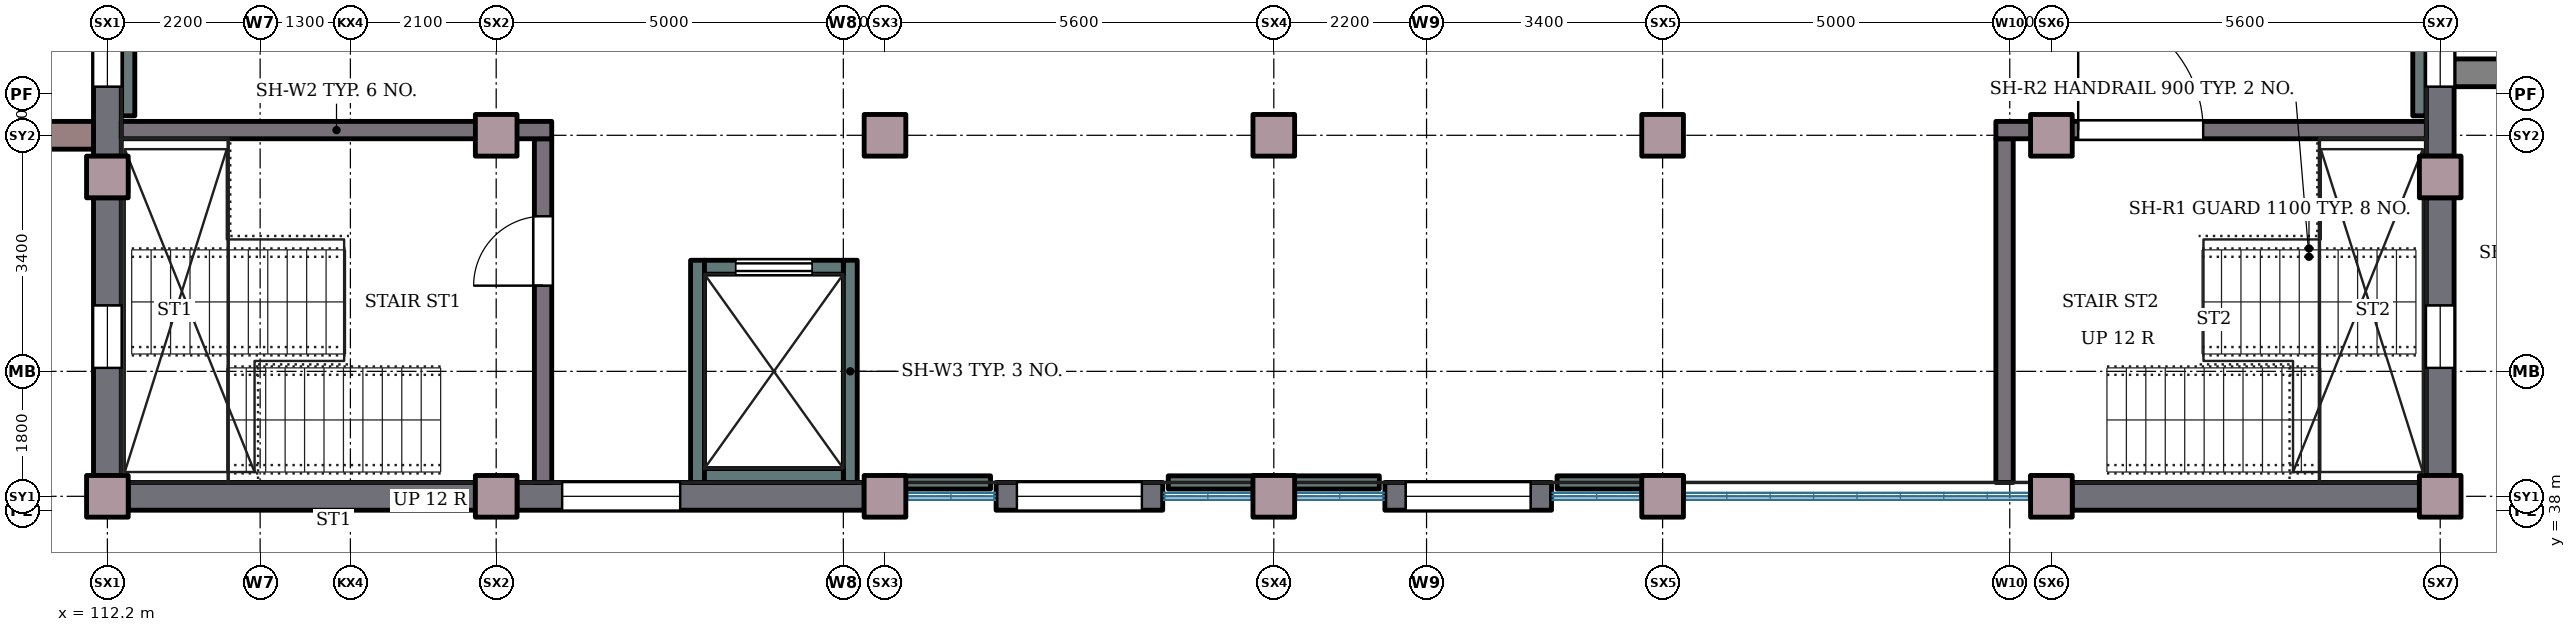
"""IFC4 building model, lengths in metres.
Left out: names, types, materials, properties, quantities, classifications, styles, units other than length and angle.
Written with IfcOpenShell. Run it as: python <this file> out.ifc"""

import sys

from ifc_helpers import new_model, si_unit, direction, frame, frame_2d, origin, origin_2d, place, context, subcontext, project, spatial, rectangle, extrude, element, fill, save


model = new_model("IFC4")
c1 = context("Model", 3, precision=1e-05, world=origin(), true_north=direction((0.0, 1.0)))
c2 = subcontext(c1, "Body", "Model", "MODEL_VIEW")
j1 = project(units=[si_unit("LENGTHUNIT", "METRE"), si_unit("PLANEANGLEUNIT", "RADIAN")], contexts=[c1])
p1 = place(None, origin())
s1 = spatial("IfcSite", under=j1, at=p1, CompositionType="ELEMENT")
p2 = place(p1, origin())
s2 = spatial("IfcBuilding", under=s1, at=p2, CompositionType="ELEMENT")
p3 = place(p2, frame((0.0, 0.0, 4.2)))
s3 = spatial("IfcBuildingStorey", under=s2, at=p3, CompositionType="ELEMENT", Elevation=4.2)
for number, where, z_axis, x_axis in (
    (1, (112.2, 38.2, 0.0), (0.0, 0.0, 1.0), (1.0, 0.0, 0.0)),
    (2, (117.8, 38.2, 0.0), (0.0, 0.0, 1.0), (1.0, 0.0, 0.0)),
    (3, (123.4, 38.2, 0.0), (0.0, 0.0, 1.0), (1.0, 0.0, 0.0)),
    (4, (129.0, 38.2, 0.0), (0.0, 0.0, 1.0), (1.0, 0.0, 0.0)),
    (5, (134.6, 38.2, 0.0), (0.0, 0.0, 1.0), (1.0, 0.0, 0.0)),
    (6, (140.2, 38.2, 0.0), (0.0, 0.0, 1.0), (1.0, 0.0, 0.0)),
    (7, (145.8, 38.2, 0.0), (0.0, 0.0, 1.0), (1.0, 0.0, 0.0)),
    (8, (112.2, 42.8, 0.0), (0.0, 0.0, 1.0), (1.0, 0.0, 0.0)),
    (9, (145.8, 42.8, 0.0), (0.0, 0.0, 1.0), (1.0, 0.0, 0.0)),
    (10, (117.8, 43.4, 0.0), (0.0, 0.0, 1.0), (1.0, 0.0, 0.0)),
    (11, (123.4, 43.4, 0.0), (0.0, 0.0, 1.0), (1.0, 0.0, 0.0)),
    (12, (129.0, 43.4, 0.0), (0.0, 0.0, 1.0), (1.0, 0.0, 0.0)),
    (13, (134.6, 43.4, 0.0), (0.0, 0.0, 1.0), (1.0, 0.0, 0.0)),
    (14, (140.2, 43.4, 0.0), (0.0, 0.0, 1.0), (1.0, 0.0, 0.0)),
):
    element("IfcColumn", number, at=place(p3, frame(where, z_axis=z_axis, x_axis=x_axis)), inside=s3, PredefinedType="COLUMN", context=c2, shape_type="SweptSolid", body=[
        extrude(rectangle(XDim=0.6, YDim=0.6, at=origin_2d()), origin(), (0.0, 0.0, 1.0), 4.2),
    ])
p4 = place(p3, frame((117.5, 38.2, 0.0), z_axis=(0.0, 0.0, 1.0), x_axis=(-1.0, 0.0, 0.0)))
e15 = element("IfcWall", 15, at=p4, inside=s3, PredefinedType="SOLIDWALL", context=c2, shape_type="SweptSolid", body=[
    extrude(rectangle(XDim=5.0, YDim=0.4, at=frame_2d((2.5, 0.0))), origin(), (0.0, 0.0, 1.0), 4.2),
])
p5 = place(p3, frame((123.1, 38.2, 0.0), z_axis=(0.0, 0.0, 1.0), x_axis=(-1.0, 0.0, 0.0)))
e16 = element("IfcWall", 16, at=p5, inside=s3, PredefinedType="SOLIDWALL", context=c2, shape_type="SweptSolid", body=[
    extrude(rectangle(XDim=5.0, YDim=0.4, at=frame_2d((2.5, 0.0))), origin(), (0.0, 0.0, 1.0), 4.2),
])
p6 = place(p5, frame((2.65, 0.0, 1.0)))
e17 = element("IfcOpeningElement", 17, at=p6, cuts=e16, PredefinedType="OPENING", context=c2, shape_type="SweptSolid", body=[
    extrude(rectangle(XDim=1.7, YDim=1.8, at=frame_2d((0.85, 0.9))), frame((0.0, 0.21, 0.0), z_axis=(0.0, -1.0, 0.0), x_axis=(1.0, 0.0, 0.0)), (0.0, 0.0, 1.0), 0.42),
])
p7 = place(p3, frame((127.4, 38.2, 0.0), z_axis=(0.0, 0.0, 1.0), x_axis=(-1.0, 0.0, 0.0)))
e18 = element("IfcWall", 18, at=p7, inside=s3, PredefinedType="SOLIDWALL", context=c2, shape_type="SweptSolid", body=[
    extrude(rectangle(XDim=2.4, YDim=0.4, at=frame_2d((1.2, 0.0))), origin(), (0.0, 0.0, 1.0), 4.2),
])
p8 = place(p7, frame((0.3, 0.0, 1.0)))
e19 = element("IfcOpeningElement", 19, at=p8, cuts=e18, PredefinedType="OPENING", context=c2, shape_type="SweptSolid", body=[
    extrude(rectangle(XDim=1.8, YDim=1.8, at=frame_2d((0.9, 0.9))), frame((0.0, 0.21, 0.0), z_axis=(0.0, -1.0, 0.0), x_axis=(1.0, 0.0, 0.0)), (0.0, 0.0, 1.0), 0.42),
])
p9 = place(p3, frame((133.0, 38.2, 0.0), z_axis=(0.0, 0.0, 1.0), x_axis=(-1.0, 0.0, 0.0)))
e20 = element("IfcWall", 20, at=p9, inside=s3, PredefinedType="SOLIDWALL", context=c2, shape_type="SweptSolid", body=[
    extrude(rectangle(XDim=2.4, YDim=0.4, at=frame_2d((1.2, 0.0))), origin(), (0.0, 0.0, 1.0), 4.2),
])
p10 = place(p9, frame((0.3, 0.0, 1.0)))
e21 = element("IfcOpeningElement", 21, at=p10, cuts=e20, PredefinedType="OPENING", context=c2, shape_type="SweptSolid", body=[
    extrude(rectangle(XDim=1.8, YDim=1.8, at=frame_2d((0.9, 0.9))), frame((0.0, 0.21, 0.0), z_axis=(0.0, -1.0, 0.0), x_axis=(1.0, 0.0, 0.0)), (0.0, 0.0, 1.0), 0.42),
])
p11 = place(p3, frame((145.5, 38.2, 0.0), z_axis=(0.0, 0.0, 1.0), x_axis=(-1.0, 0.0, 0.0)))
e22 = element("IfcWall", 22, at=p11, inside=s3, PredefinedType="SOLIDWALL", context=c2, shape_type="SweptSolid", body=[
    extrude(rectangle(XDim=5.0, YDim=0.4, at=frame_2d((2.5, 0.0))), origin(), (0.0, 0.0, 1.0), 4.2),
])
p12 = place(p3, frame((112.2, 38.5, 0.0), z_axis=(0.0, 0.0, 1.0), x_axis=(0.0, 1.0, 0.0)))
e23 = element("IfcWall", 23, at=p12, inside=s3, PredefinedType="SOLIDWALL", context=c2, shape_type="SweptSolid", body=[
    extrude(rectangle(XDim=4.0, YDim=0.4, at=frame_2d((2.0, 0.0))), origin(), (0.0, 0.0, 1.0), 4.2),
])
p13 = place(p12, frame((1.55, 0.0, 0.9)))
e24 = element("IfcOpeningElement", 24, at=p13, cuts=e23, PredefinedType="OPENING", context=c2, shape_type="SweptSolid", body=[
    extrude(rectangle(XDim=0.9, YDim=1.5, at=frame_2d((0.45, 0.75))), frame((0.0, 0.21, 0.0), z_axis=(0.0, -1.0, 0.0), x_axis=(1.0, 0.0, 0.0)), (0.0, 0.0, 1.0), 0.42),
])
p14 = place(p3, frame((112.2, 43.1, 0.0), z_axis=(0.0, 0.0, 1.0), x_axis=(0.0, 1.0, 0.0)))
e25 = element("IfcWall", 25, at=p14, inside=s3, PredefinedType="SOLIDWALL", context=c2, shape_type="SweptSolid", body=[
    extrude(rectangle(XDim=4.0, YDim=0.4, at=frame_2d((2.0, 0.0))), origin(), (0.0, 0.0, 1.0), 4.2),
])
p15 = place(p14, frame((1.0, 0.0, 2.4)))
e26 = element("IfcOpeningElement", 26, at=p15, cuts=e25, PredefinedType="OPENING", context=c2, shape_type="SweptSolid", body=[
    extrude(rectangle(XDim=2.0, YDim=1.2, at=frame_2d((1.0, 0.6))), frame((0.0, 0.21, 0.0), z_axis=(0.0, -1.0, 0.0), x_axis=(1.0, 0.0, 0.0)), (0.0, 0.0, 1.0), 0.42),
])
p16 = place(p3, frame((145.8, 38.5, 0.0), z_axis=(0.0, 0.0, 1.0), x_axis=(0.0, 1.0, 0.0)))
e27 = element("IfcWall", 27, at=p16, inside=s3, PredefinedType="SOLIDWALL", context=c2, shape_type="SweptSolid", body=[
    extrude(rectangle(XDim=4.0, YDim=0.4, at=frame_2d((2.0, 0.0))), origin(), (0.0, 0.0, 1.0), 4.2),
])
p17 = place(p16, frame((1.55, 0.0, 0.9)))
e28 = element("IfcOpeningElement", 28, at=p17, cuts=e27, PredefinedType="OPENING", context=c2, shape_type="SweptSolid", body=[
    extrude(rectangle(XDim=0.9, YDim=1.5, at=frame_2d((0.45, 0.75))), frame((0.0, 0.21, 0.0), z_axis=(0.0, -1.0, 0.0), x_axis=(1.0, 0.0, 0.0)), (0.0, 0.0, 1.0), 0.42),
])
p18 = place(p3, frame((145.8, 43.1, 0.0), z_axis=(0.0, 0.0, 1.0), x_axis=(0.0, 1.0, 0.0)))
e29 = element("IfcWall", 29, at=p18, inside=s3, PredefinedType="SOLIDWALL", context=c2, shape_type="SweptSolid", body=[
    extrude(rectangle(XDim=4.0, YDim=0.4, at=frame_2d((2.0, 0.0))), origin(), (0.0, 0.0, 1.0), 4.2),
])
p19 = place(p18, frame((1.0, 0.0, 2.4)))
e30 = element("IfcOpeningElement", 30, at=p19, cuts=e29, PredefinedType="OPENING", context=c2, shape_type="SweptSolid", body=[
    extrude(rectangle(XDim=2.0, YDim=1.2, at=frame_2d((1.0, 0.6))), frame((0.0, 0.21, 0.0), z_axis=(0.0, -1.0, 0.0), x_axis=(1.0, 0.0, 0.0)), (0.0, 0.0, 1.0), 0.42),
])
p20 = place(p3, frame((118.475, 38.4, 0.0), z_axis=(0.0, 0.0, 1.0), x_axis=(0.0, 1.0, 0.0)))
e31 = element("IfcWall", 31, at=p20, inside=s3, PredefinedType="SHEAR", context=c2, shape_type="SweptSolid", body=[
    extrude(rectangle(XDim=4.95, YDim=0.25, at=frame_2d((2.475, 0.0))), origin(), (0.0, 0.0, 1.0), 4.2),
])
p21 = place(p20, frame((2.834, 0.0, 0.0)))
e32 = element("IfcOpeningElement", 32, at=p21, cuts=e31, PredefinedType="OPENING", context=c2, shape_type="SweptSolid", body=[
    extrude(rectangle(XDim=1.0, YDim=2.1, at=frame_2d((0.5, 1.05))), frame((0.0, 0.135, 0.0), z_axis=(0.0, -1.0, 0.0), x_axis=(1.0, 0.0, 0.0)), (0.0, 0.0, 1.0), 0.27),
])
p22 = place(p3, frame((112.4, 43.475, 0.0), z_axis=(0.0, 0.0, 1.0), x_axis=(1.0, 0.0, 0.0)))
e33 = element("IfcWall", 33, at=p22, inside=s3, PredefinedType="SHEAR", context=c2, shape_type="SweptSolid", body=[
    extrude(rectangle(XDim=6.2, YDim=0.25, at=frame_2d((3.1, 0.0))), origin(), (0.0, 0.0, 1.0), 4.2),
])
p23 = place(p3, frame((139.525, 38.4, 0.0), z_axis=(0.0, 0.0, 1.0), x_axis=(0.0, 1.0, 0.0)))
e34 = element("IfcWall", 34, at=p23, inside=s3, PredefinedType="SHEAR", context=c2, shape_type="SweptSolid", body=[
    extrude(rectangle(XDim=4.95, YDim=0.25, at=frame_2d((2.475, 0.0))), origin(), (0.0, 0.0, 1.0), 4.2),
])
p24 = place(p3, frame((139.4, 43.475, 0.0), z_axis=(0.0, 0.0, 1.0), x_axis=(1.0, 0.0, 0.0)))
e35 = element("IfcWall", 35, at=p24, inside=s3, PredefinedType="SHEAR", context=c2, shape_type="SweptSolid", body=[
    extrude(rectangle(XDim=6.2, YDim=0.25, at=frame_2d((3.1, 0.0))), origin(), (0.0, 0.0, 1.0), 4.2),
])
p25 = place(p24, frame((1.186, 0.0, 0.0)))
e36 = element("IfcOpeningElement", 36, at=p25, cuts=e35, PredefinedType="OPENING", context=c2, shape_type="SweptSolid", body=[
    extrude(rectangle(XDim=1.8, YDim=2.1, at=frame_2d((0.9, 1.05))), frame((0.0, 0.135, 0.0), z_axis=(0.0, -1.0, 0.0), x_axis=(1.0, 0.0, 0.0)), (0.0, 0.0, 1.0), 0.27),
])
for number, where, z_axis, x_axis in (
    (37, (120.7, 38.4, 0.0), (0.0, 0.0, 1.0), (0.0, 1.0, 0.0)),
    (38, (122.9, 38.4, 0.0), (0.0, 0.0, 1.0), (0.0, 1.0, 0.0)),
):
    element("IfcWall", number, at=place(p3, frame(where, z_axis=z_axis, x_axis=x_axis)), inside=s3, PredefinedType="SHEAR", context=c2, shape_type="SweptSolid", body=[
        extrude(rectangle(XDim=3.2, YDim=0.2, at=frame_2d((1.6, 0.0))), origin(), (0.0, 0.0, 1.0), 4.2),
    ])
p26 = place(p3, frame((120.8, 38.5, 0.0), z_axis=(0.0, 0.0, 1.0), x_axis=(1.0, 0.0, 0.0)))
e39 = element("IfcWall", 39, at=p26, inside=s3, PredefinedType="SHEAR", context=c2, shape_type="SweptSolid", body=[
    extrude(rectangle(XDim=2.0, YDim=0.2, at=frame_2d((1.0, 0.0))), origin(), (0.0, 0.0, 1.0), 4.2),
])
p27 = place(p3, frame((120.8, 41.5, 0.0), z_axis=(0.0, 0.0, 1.0), x_axis=(1.0, 0.0, 0.0)))
e40 = element("IfcWall", 40, at=p27, inside=s3, PredefinedType="SHEAR", context=c2, shape_type="SweptSolid", body=[
    extrude(rectangle(XDim=2.0, YDim=0.2, at=frame_2d((1.0, 0.0))), origin(), (0.0, 0.0, 1.0), 4.2),
])
p28 = place(p27, frame((0.45, 0.0, 0.0)))
e41 = element("IfcOpeningElement", 41, at=p28, cuts=e40, PredefinedType="OPENING", context=c2, shape_type="SweptSolid", body=[
    extrude(rectangle(XDim=1.1, YDim=2.1, at=frame_2d((0.55, 1.05))), frame((0.0, 0.11, 0.0), z_axis=(0.0, -1.0, 0.0), x_axis=(1.0, 0.0, 0.0)), (0.0, 0.0, 1.0), 0.22),
])
p29 = place(p3, frame((110.3, 43.4, 0.0), z_axis=(0.0, 0.0, 1.0), x_axis=(1.0, 0.0, 0.0)))
e42 = element("IfcWall", 42, at=p29, inside=s3, PredefinedType="STANDARD", context=c2, shape_type="SweptSolid", body=[
    extrude(rectangle(XDim=1.7, YDim=0.4, at=frame_2d((0.85, 0.0))), origin(), (0.0, 0.0, 1.0), 4.2),
])
p30 = place(p3, frame((148.1, 44.3, 0.0), z_axis=(0.0, 0.0, 1.0), x_axis=(-1.0, 0.0, 0.0)))
e43 = element("IfcWall", 43, at=p30, inside=s3, PredefinedType="STANDARD", context=c2, shape_type="SweptSolid", body=[
    extrude(rectangle(XDim=2.1, YDim=0.4, at=frame_2d((1.05, 0.0))), origin(), (0.0, 0.0, 1.0), 4.2),
])
p31 = place(p3, frame((112.4, 43.02, 0.0), z_axis=(0.0, 0.0, 1.0), x_axis=(0.0, -1.0, 0.0)))
e44 = element("IfcWall", 44, at=p31, inside=s3, PredefinedType="PARTITIONING", context=c2, shape_type="SweptSolid", body=[
    extrude(rectangle(XDim=0.44, YDim=0.19, at=frame_2d((0.22, 0.0))), origin(), (0.0, 0.0, 1.0), 3.98),
])
p32 = place(p3, frame((112.5, 43.68, 0.0), z_axis=(0.0, 0.0, 1.0), x_axis=(0.0, 1.0, 0.0)))
e45 = element("IfcWall", 45, at=p32, inside=s3, PredefinedType="PARTITIONING", context=c2, shape_type="SweptSolid", body=[
    extrude(rectangle(XDim=18.52, YDim=0.19, at=frame_2d((9.26, 0.0))), origin(), (0.0, 0.0, 1.0), 3.98),
])
p33 = place(p3, frame((117.58, 38.4, 0.0), z_axis=(0.0, 0.0, 1.0), x_axis=(1.0, 0.0, 0.0)))
e46 = element("IfcWall", 46, at=p33, inside=s3, PredefinedType="PARTITIONING", context=c2, shape_type="SweptSolid", body=[
    extrude(rectangle(XDim=0.44, YDim=0.19, at=frame_2d((0.22, 0.0))), origin(), (0.0, 0.0, 1.0), 3.98),
])
p34 = place(p3, frame((124.92, 38.4, 0.0), z_axis=(0.0, 0.0, 1.0), x_axis=(-1.0, 0.0, 0.0)))
e47 = element("IfcWall", 47, at=p34, inside=s3, PredefinedType="PARTITIONING", context=c2, shape_type="SweptSolid", body=[
    extrude(rectangle(XDim=1.5, YDim=0.19, at=frame_2d((0.75, 0.0))), origin(), (0.0, 0.0, 1.0), 3.98),
])
p35 = place(p3, frame((130.52, 38.4, 0.0), z_axis=(0.0, 0.0, 1.0), x_axis=(-1.0, 0.0, 0.0)))
e48 = element("IfcWall", 48, at=p35, inside=s3, PredefinedType="PARTITIONING", context=c2, shape_type="SweptSolid", body=[
    extrude(rectangle(XDim=3.04, YDim=0.19, at=frame_2d((1.52, 0.0))), origin(), (0.0, 0.0, 1.0), 3.98),
])
p36 = place(p3, frame((134.9, 38.4, 0.0), z_axis=(0.0, 0.0, 1.0), x_axis=(-1.0, 0.0, 0.0)))
e49 = element("IfcWall", 49, at=p36, inside=s3, PredefinedType="PARTITIONING", context=c2, shape_type="SweptSolid", body=[
    extrude(rectangle(XDim=1.82, YDim=0.19, at=frame_2d((0.91, 0.0))), origin(), (0.0, 0.0, 1.0), 3.98),
])
p37 = place(p3, frame((139.9, 38.4, 0.0), z_axis=(0.0, 0.0, 1.0), x_axis=(1.0, 0.0, 0.0)))
e50 = element("IfcWall", 50, at=p37, inside=s3, PredefinedType="PARTITIONING", context=c2, shape_type="SweptSolid", body=[
    extrude(rectangle(XDim=0.52, YDim=0.19, at=frame_2d((0.26, 0.0))), origin(), (0.0, 0.0, 1.0), 3.98),
])
p38 = place(p3, frame((145.5, 59.92, 0.0), z_axis=(0.0, 0.0, 1.0), x_axis=(0.0, -1.0, 0.0)))
e51 = element("IfcWall", 51, at=p38, inside=s3, PredefinedType="PARTITIONING", context=c2, shape_type="SweptSolid", body=[
    extrude(rectangle(XDim=16.24, YDim=0.19, at=frame_2d((8.12, 0.0))), origin(), (0.0, 0.0, 1.0), 3.98),
])
p39 = place(p3, frame((145.6, 42.58, 0.0), z_axis=(0.0, 0.0, 1.0), x_axis=(0.0, 1.0, 0.0)))
e52 = element("IfcWall", 52, at=p39, inside=s3, PredefinedType="PARTITIONING", context=c2, shape_type="SweptSolid", body=[
    extrude(rectangle(XDim=0.44, YDim=0.19, at=frame_2d((0.22, 0.0))), origin(), (0.0, 0.0, 1.0), 3.98),
])
p40 = place(p8, origin())
e53 = element("IfcWindow", 53, at=p40, inside=s3, PartitioningType="SINGLE_PANEL", PredefinedType="WINDOW", context=c2, shape_type="SweptSolid", body=[
    extrude(rectangle(XDim=1.8, YDim=1.8, at=frame_2d((0.9, 0.9))), frame((0.0, 0.03, 0.0), z_axis=(0.0, -1.0, 0.0), x_axis=(1.0, 0.0, 0.0)), (0.0, 0.0, 1.0), 0.06),
])
fill(e19, e53)
p41 = place(p10, origin())
e54 = element("IfcWindow", 54, at=p41, inside=s3, PartitioningType="SINGLE_PANEL", PredefinedType="WINDOW", context=c2, shape_type="SweptSolid", body=[
    extrude(rectangle(XDim=1.8, YDim=1.8, at=frame_2d((0.9, 0.9))), frame((0.0, 0.03, 0.0), z_axis=(0.0, -1.0, 0.0), x_axis=(1.0, 0.0, 0.0)), (0.0, 0.0, 1.0), 0.06),
])
fill(e21, e54)
p42 = place(p13, origin())
e55 = element("IfcWindow", 55, at=p42, inside=s3, PartitioningType="SINGLE_PANEL", PredefinedType="WINDOW", context=c2, shape_type="SweptSolid", body=[
    extrude(rectangle(XDim=0.9, YDim=1.5, at=frame_2d((0.45, 0.75))), frame((0.0, 0.03, 0.0), z_axis=(0.0, -1.0, 0.0), x_axis=(1.0, 0.0, 0.0)), (0.0, 0.0, 1.0), 0.06),
])
fill(e24, e55)
p43 = place(p17, origin())
e56 = element("IfcWindow", 56, at=p43, inside=s3, PartitioningType="SINGLE_PANEL", PredefinedType="WINDOW", context=c2, shape_type="SweptSolid", body=[
    extrude(rectangle(XDim=0.9, YDim=1.5, at=frame_2d((0.45, 0.75))), frame((0.0, 0.03, 0.0), z_axis=(0.0, -1.0, 0.0), x_axis=(1.0, 0.0, 0.0)), (0.0, 0.0, 1.0), 0.06),
])
fill(e28, e56)
p44 = place(p15, origin())
e57 = element("IfcWindow", 57, at=p44, inside=s3, PartitioningType="SINGLE_PANEL", PredefinedType="WINDOW", context=c2, shape_type="SweptSolid", body=[
    extrude(rectangle(XDim=2.0, YDim=1.2, at=frame_2d((1.0, 0.6))), frame((0.0, 0.03, 0.0), z_axis=(0.0, -1.0, 0.0), x_axis=(1.0, 0.0, 0.0)), (0.0, 0.0, 1.0), 0.06),
])
fill(e26, e57)
p45 = place(p19, origin())
e58 = element("IfcWindow", 58, at=p45, inside=s3, PartitioningType="SINGLE_PANEL", PredefinedType="WINDOW", context=c2, shape_type="SweptSolid", body=[
    extrude(rectangle(XDim=2.0, YDim=1.2, at=frame_2d((1.0, 0.6))), frame((0.0, 0.03, 0.0), z_axis=(0.0, -1.0, 0.0), x_axis=(1.0, 0.0, 0.0)), (0.0, 0.0, 1.0), 0.06),
])
fill(e30, e58)
p46 = place(p6, origin())
e59 = element("IfcWindow", 59, at=p46, inside=s3, PartitioningType="SINGLE_PANEL", PredefinedType="WINDOW", context=c2, shape_type="SweptSolid", body=[
    extrude(rectangle(XDim=1.7, YDim=1.8, at=frame_2d((0.85, 0.9))), frame((0.0, 0.03, 0.0), z_axis=(0.0, -1.0, 0.0), x_axis=(1.0, 0.0, 0.0)), (0.0, 0.0, 1.0), 0.06),
])
fill(e17, e59)
p47 = place(p28, origin())
e60 = element("IfcDoor", 60, at=p47, inside=s3, OperationType="SLIDING_TO_LEFT", PredefinedType="DOOR", context=c2, shape_type="SweptSolid", body=[
    extrude(rectangle(XDim=1.1, YDim=2.1, at=frame_2d((0.55, 1.05))), frame((0.0, 0.025, 0.0), z_axis=(0.0, -1.0, 0.0), x_axis=(1.0, 0.0, 0.0)), (0.0, 0.0, 1.0), 0.05),
])
fill(e41, e60)
p48 = place(p25, origin())
e61 = element("IfcDoor", 61, at=p48, inside=s3, OperationType="DOUBLE_DOOR_SINGLE_SWING", PredefinedType="DOOR", context=c2, shape_type="SweptSolid", body=[
    extrude(rectangle(XDim=1.8, YDim=2.1, at=frame_2d((0.9, 1.05))), frame((0.0, 0.025, 0.0), z_axis=(0.0, -1.0, 0.0), x_axis=(1.0, 0.0, 0.0)), (0.0, 0.0, 1.0), 0.05),
])
fill(e36, e61)
p49 = place(p21, origin())
e62 = element("IfcDoor", 62, at=p49, inside=s3, OperationType="SINGLE_SWING_LEFT", PredefinedType="DOOR", context=c2, shape_type="SweptSolid", body=[
    extrude(rectangle(XDim=1.0, YDim=2.1, at=frame_2d((0.5, 1.05))), frame((0.0, 0.025, 0.0), z_axis=(0.0, -1.0, 0.0), x_axis=(1.0, 0.0, 0.0)), (0.0, 0.0, 1.0), 0.05),
])
fill(e32, e62)
save(model, sys.argv[1])
